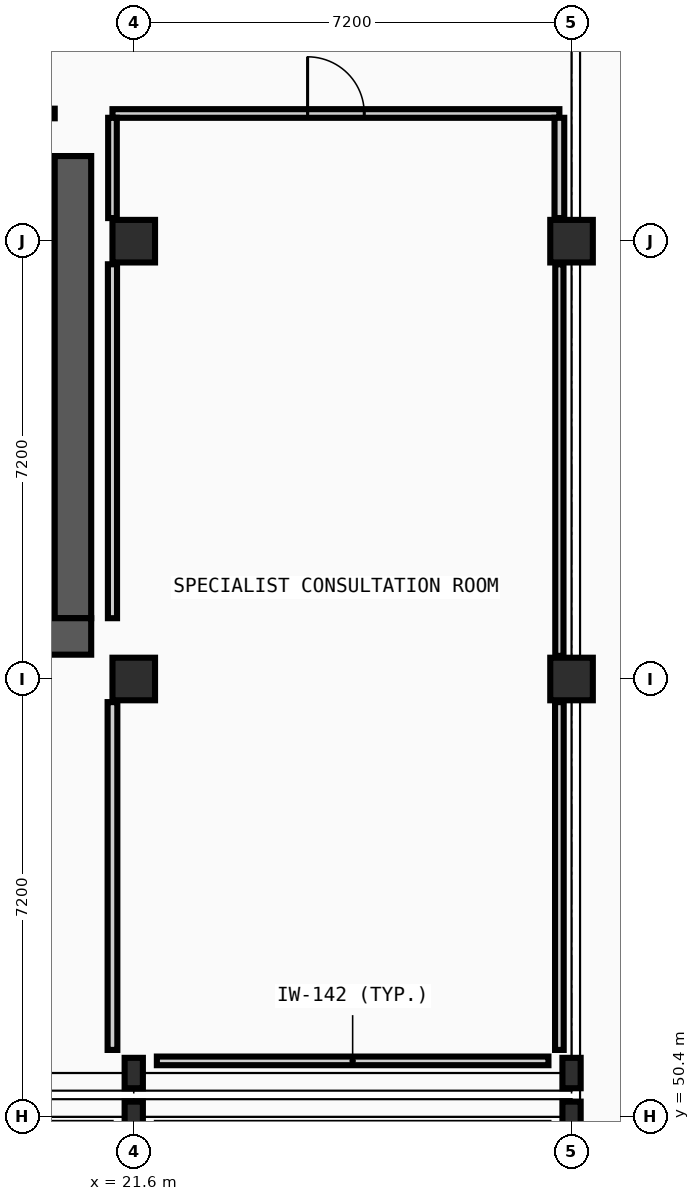
"""IFC4 building model, lengths in metres.
Left out: names, types, materials, properties, quantities, classifications, styles, units other than length and angle.
Written with IfcOpenShell. Run it as: python <this file> out.ifc"""

import sys

from ifc_helpers import new_model, si_unit, direction, frame, frame_2d, origin, origin_2d, place, context, subcontext, project, spatial, rectangle, i_section, extrude, element, fill, save


model = new_model("IFC4")
c1 = context("Model", 3, precision=1e-05, world=origin(), true_north=direction((0.0, 1.0)))
c2 = subcontext(c1, "Body", "Model", "MODEL_VIEW")
j1 = project(units=[si_unit("LENGTHUNIT", "METRE"), si_unit("PLANEANGLEUNIT", "RADIAN")], contexts=[c1])
p1 = place(None, origin())
s1 = spatial("IfcSite", under=j1, at=p1, CompositionType="ELEMENT")
p2 = place(p1, origin())
s2 = spatial("IfcBuilding", under=s1, at=p2, CompositionType="ELEMENT")
p3 = place(p2, frame((0.0, 0.0, -4.8)))
s3 = spatial("IfcBuildingStorey", under=s2, at=p3, CompositionType="ELEMENT", Elevation=-4.8)
for number, where, z_axis, x_axis in (
    (1, (21.6, 50.4, 0.0), (0.0, 0.0, 1.0), (1.0, 0.0, 0.0)),
    (2, (21.6, 51.12, 0.0), (0.0, 0.0, 1.0), (1.0, 0.0, 0.0)),
):
    element("IfcColumn", number, at=place(p3, frame(where, z_axis=z_axis, x_axis=x_axis)), inside=s3, PredefinedType="COLUMN", context=c2, shape_type="SweptSolid", body=[
        extrude(i_section(OverallWidth=0.3, OverallDepth=0.5, WebThickness=0.014, FlangeThickness=0.028, FilletRadius=0.027, at=origin_2d()), origin(), (0.0, 0.0, 1.0), 4.8),
    ])
for number, where, z_axis, x_axis in (
    (3, (21.6, 57.6, 0.0), (0.0, 0.0, 1.0), (1.0, 0.0, 0.0)),
    (4, (21.6, 64.8, 0.0), (0.0, 0.0, 1.0), (1.0, 0.0, 0.0)),
):
    element("IfcColumn", number, at=place(p3, frame(where, z_axis=z_axis, x_axis=x_axis)), inside=s3, PredefinedType="COLUMN", context=c2, shape_type="SweptSolid", body=[
        extrude(rectangle(XDim=0.7, YDim=0.7, at=origin_2d()), origin(), (0.0, 0.0, 1.0), 4.8),
    ])
for number, where, z_axis, x_axis in (
    (5, (28.8, 50.4, 0.0), (0.0, 0.0, 1.0), (1.0, 0.0, 0.0)),
    (6, (28.8, 51.12, 0.0), (0.0, 0.0, 1.0), (1.0, 0.0, 0.0)),
):
    element("IfcColumn", number, at=place(p3, frame(where, z_axis=z_axis, x_axis=x_axis)), inside=s3, PredefinedType="COLUMN", context=c2, shape_type="SweptSolid", body=[
        extrude(i_section(OverallWidth=0.3, OverallDepth=0.5, WebThickness=0.014, FlangeThickness=0.028, FilletRadius=0.027, at=origin_2d()), origin(), (0.0, 0.0, 1.0), 4.8),
    ])
for number, where, z_axis, x_axis in (
    (7, (28.8, 57.6, 0.0), (0.0, 0.0, 1.0), (1.0, 0.0, 0.0)),
    (8, (28.8, 64.8, 0.0), (0.0, 0.0, 1.0), (1.0, 0.0, 0.0)),
):
    element("IfcColumn", number, at=place(p3, frame(where, z_axis=z_axis, x_axis=x_axis)), inside=s3, PredefinedType="COLUMN", context=c2, shape_type="SweptSolid", body=[
        extrude(rectangle(XDim=0.7, YDim=0.7, at=origin_2d()), origin(), (0.0, 0.0, 1.0), 4.8),
    ])
p4 = place(p3, frame((20.6, 58.6, 0.0), z_axis=(0.0, 0.0, 1.0), x_axis=(0.0, 1.0, 0.0)))
e9 = element("IfcWall", 9, at=p4, inside=s3, PredefinedType="SHEAR", context=c2, shape_type="SweptSolid", body=[
    extrude(rectangle(XDim=7.6, YDim=0.6, at=frame_2d((3.8, 0.0))), origin(), (0.0, 0.0, 1.0), 4.5),
])
p5 = place(p3, frame((7.9, 58.3, 0.0), z_axis=(0.0, 0.0, 1.0), x_axis=(1.0, 0.0, 0.0)))
e10 = element("IfcWall", 10, at=p5, inside=s3, PredefinedType="SHEAR", context=c2, shape_type="SweptSolid", body=[
    extrude(rectangle(XDim=13.0, YDim=0.6, at=frame_2d((6.5, 0.0))), origin(), (0.0, 0.0, 1.0), 4.5),
])
p6 = place(p3, frame((21.98, 51.32, 0.0), z_axis=(0.0, 0.0, 1.0), x_axis=(1.0, 0.0, 0.0)))
e11 = element("IfcWall", 11, at=p6, inside=s3, PredefinedType="PARTITIONING", context=c2, shape_type="SweptSolid", body=[
    extrude(rectangle(XDim=6.44, YDim=0.142, at=frame_2d((3.22, 0.0))), origin(), (0.0, 0.0, 1.0), 4.085),
])
p7 = place(p3, frame((8.5, 66.9, 0.0), z_axis=(0.0, 0.0, 1.0), x_axis=(1.0, 0.0, 0.0)))
e12 = element("IfcWall", 12, at=p7, inside=s3, PredefinedType="PARTITIONING", context=c2, shape_type="SweptSolid", body=[
    extrude(rectangle(XDim=11.8, YDim=0.158, at=frame_2d((5.9, 0.0))), origin(), (0.0, 0.0, 1.0), 4.545),
])
p8 = place(p7, frame((9.85, 0.0, 0.0)))
e13 = element("IfcOpeningElement", 13, at=p8, cuts=e12, PredefinedType="OPENING", context=c2, shape_type="SweptSolid", body=[
    extrude(rectangle(XDim=1.5, YDim=2.2, at=frame_2d((0.75, 1.1))), frame((0.0, 0.089, 0.0), z_axis=(0.0, -1.0, 0.0), x_axis=(1.0, 0.0, 0.0)), (0.0, 0.0, 1.0), 0.178),
])
p9 = place(p3, frame((21.25, 66.9, 0.0), z_axis=(0.0, 0.0, 1.0), x_axis=(1.0, 0.0, 0.0)))
e14 = element("IfcWall", 14, at=p9, inside=s3, PredefinedType="PARTITIONING", context=c2, shape_type="SweptSolid", body=[
    extrude(rectangle(XDim=7.35, YDim=0.142, at=frame_2d((3.675, 0.0))), origin(), (0.0, 0.0, 1.0), 4.545),
])
p10 = place(p9, frame((3.209, 0.0, 0.0)))
e15 = element("IfcOpeningElement", 15, at=p10, cuts=e14, PredefinedType="OPENING", context=c2, shape_type="SweptSolid", body=[
    extrude(rectangle(XDim=0.932, YDim=2.068, at=frame_2d((0.466, 1.034))), frame((0.0, 0.081, 0.0), z_axis=(0.0, -1.0, 0.0), x_axis=(1.0, 0.0, 0.0)), (0.0, 0.0, 1.0), 0.162),
])
p11 = place(p3, frame((21.25, 51.5, 0.0), z_axis=(0.0, 0.0, 1.0), x_axis=(0.0, 1.0, 0.0)))
e16 = element("IfcWall", 16, at=p11, inside=s3, PredefinedType="PARTITIONING", context=c2, shape_type="SweptSolid", body=[
    extrude(rectangle(XDim=5.72, YDim=0.16, at=frame_2d((2.86, 0.0))), origin(), (0.0, 0.0, 1.0), 4.545),
])
p12 = place(p3, frame((21.25, 58.6, 0.0), z_axis=(0.0, 0.0, 1.0), x_axis=(0.0, 1.0, 0.0)))
e17 = element("IfcWall", 17, at=p12, inside=s3, PredefinedType="PARTITIONING", context=c2, shape_type="SweptSolid", body=[
    extrude(rectangle(XDim=5.82, YDim=0.15, at=frame_2d((2.91, 0.0))), origin(), (0.0, 0.0, 1.0), 4.545),
])
p13 = place(p3, frame((21.25, 65.18, 0.0), z_axis=(0.0, 0.0, 1.0), x_axis=(0.0, 1.0, 0.0)))
e18 = element("IfcWall", 18, at=p13, inside=s3, PredefinedType="PARTITIONING", context=c2, shape_type="SweptSolid", body=[
    extrude(rectangle(XDim=1.649, YDim=0.142, at=frame_2d((0.825, 0.0))), origin(), (0.0, 0.0, 1.0), 4.545),
])
p14 = place(p3, frame((28.6, 51.5, 0.0), z_axis=(0.0, 0.0, 1.0), x_axis=(0.0, 1.0, 0.0)))
e19 = element("IfcWall", 19, at=p14, inside=s3, PredefinedType="PARTITIONING", context=c2, shape_type="SweptSolid", body=[
    extrude(rectangle(XDim=5.72, YDim=0.142, at=frame_2d((2.86, 0.0))), origin(), (0.0, 0.0, 1.0), 4.235),
])
p15 = place(p3, frame((28.6, 57.98, 0.0), z_axis=(0.0, 0.0, 1.0), x_axis=(0.0, 1.0, 0.0)))
e20 = element("IfcWall", 20, at=p15, inside=s3, PredefinedType="PARTITIONING", context=c2, shape_type="SweptSolid", body=[
    extrude(rectangle(XDim=6.44, YDim=0.135, at=frame_2d((3.22, 0.0))), origin(), (0.0, 0.0, 1.0), 4.235),
])
p16 = place(p3, frame((28.6, 65.18, 0.0), z_axis=(0.0, 0.0, 1.0), x_axis=(0.0, 1.0, 0.0)))
e21 = element("IfcWall", 21, at=p16, inside=s3, PredefinedType="PARTITIONING", context=c2, shape_type="SweptSolid", body=[
    extrude(rectangle(XDim=1.649, YDim=0.16, at=frame_2d((0.825, 0.0))), origin(), (0.0, 0.0, 1.0), 4.235),
])
p17 = place(p10, origin())
e22 = element("IfcDoor", 22, at=p17, inside=s3, OperationType="SINGLE_SWING_LEFT", PredefinedType="DOOR", context=c2, shape_type="SweptSolid", body=[
    extrude(rectangle(XDim=0.932, YDim=2.068, at=frame_2d((0.466, 1.034))), frame((0.0, 0.025, 0.0), z_axis=(0.0, -1.0, 0.0), x_axis=(1.0, 0.0, 0.0)), (0.0, 0.0, 1.0), 0.05),
])
fill(e15, e22)
save(model, sys.argv[1])
